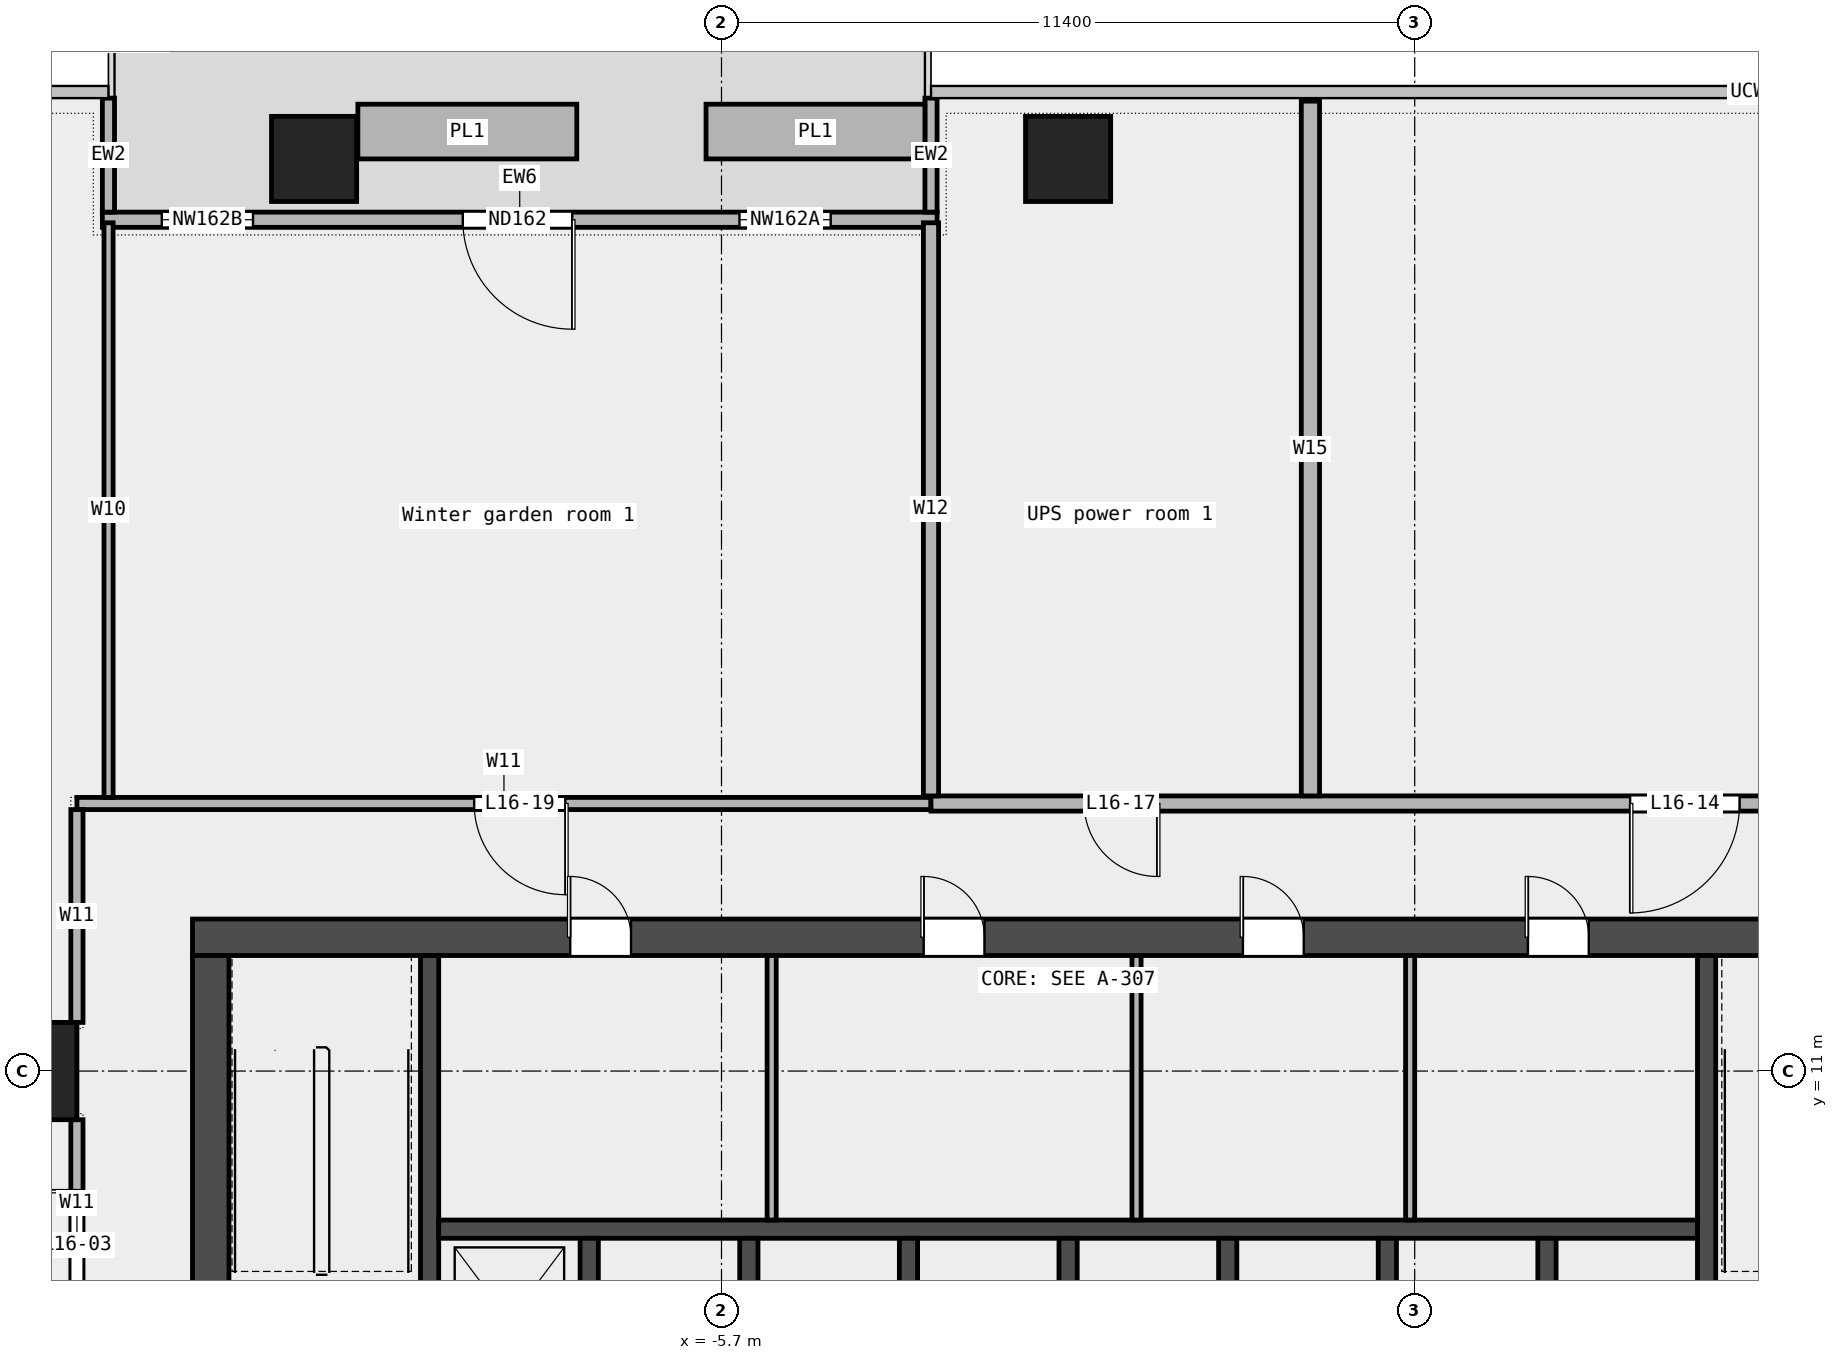
"""IFC4 building model, lengths in metres.
Left out: names, types, materials, properties, quantities, classifications, styles, units other than length and angle.
Written with IfcOpenShell. Run it as: python <this file> out.ifc"""

import sys

from ifc_helpers import new_model, si_unit, direction, frame, frame_2d, origin, origin_2d, place, context, subcontext, project, spatial, rectangle, extrude, element, fill, save


model = new_model("IFC4")
c1 = context("Model", 3, precision=1e-05, world=origin(), true_north=direction((0.0, 1.0)))
c2 = subcontext(c1, "Body", "Model", "MODEL_VIEW")
j1 = project(units=[si_unit("LENGTHUNIT", "METRE"), si_unit("PLANEANGLEUNIT", "RADIAN")], contexts=[c1])
p1 = place(None, origin())
s1 = spatial("IfcSite", under=j1, at=p1, CompositionType="ELEMENT")
p2 = place(p1, origin())
s2 = spatial("IfcBuilding", under=s1, at=p2, CompositionType="ELEMENT")
p3 = place(p2, frame((0.0, 0.0, 83.8)))
s3 = spatial("IfcBuildingStorey", under=s2, at=p3, CompositionType="ELEMENT", Elevation=83.8)
for number, where, z_axis, x_axis in (
    (1, (0.0, 26.0, 0.0), (0.0, 0.0, 1.0), (1.0, 0.0, 0.0)),
    (2, (-12.4, 26.0, 0.0), (0.0, 0.0, 1.0), (1.0, 0.0, 0.0)),
):
    element("IfcColumn", number, at=place(p3, frame(where, z_axis=z_axis, x_axis=x_axis)), inside=s3, PredefinedType="COLUMN", context=c2, shape_type="SweptSolid", body=[
        extrude(rectangle(XDim=1.4, YDim=1.4, at=origin_2d()), origin(), (0.0, 0.0, 1.0), 4.2),
    ])
p4 = place(p3, frame((-17.1, 11.0, 0.0), z_axis=(0.0, 0.0, 1.0), x_axis=(1.0, 0.0, 0.0)))
e3 = element("IfcColumn", 3, at=p4, inside=s3, PredefinedType="COLUMN", context=c2, shape_type="SweptSolid", body=[
    extrude(rectangle(XDim=1.6, YDim=1.6, at=origin_2d()), origin(), (0.0, 0.0, 1.0), 4.2),
])
p5 = place(p3, frame((-2.155, 25.0, 0.0), z_axis=(0.0, 0.0, 1.0), x_axis=(-1.0, 0.0, 0.0)))
e4 = element("IfcWall", 4, at=p5, inside=s3, PredefinedType="STANDARD", context=c2, shape_type="SweptSolid", body=[
    extrude(rectangle(XDim=13.727, YDim=0.25, at=frame_2d((6.864, 0.0))), origin(), (0.0, 0.0, 1.0), 4.2),
])
p6 = place(p5, frame((1.75, 0.0, 0.45)))
e5 = element("IfcOpeningElement", 5, at=p6, cuts=e4, PredefinedType="OPENING", context=c2, shape_type="SweptSolid", body=[
    extrude(rectangle(XDim=1.5, YDim=3.0, at=frame_2d((0.75, 1.5))), frame((0.0, 0.137, 0.0), z_axis=(0.0, -1.0, 0.0), x_axis=(1.0, 0.0, 0.0)), (0.0, 0.0, 1.0), 0.274),
])
p7 = place(p5, frame((6.0, 0.0, 0.0)))
e6 = element("IfcOpeningElement", 6, at=p7, cuts=e4, PredefinedType="OPENING", context=c2, shape_type="SweptSolid", body=[
    extrude(rectangle(XDim=1.8, YDim=2.4, at=frame_2d((0.9, 1.2))), frame((0.0, 0.137, 0.0), z_axis=(0.0, -1.0, 0.0), x_axis=(1.0, 0.0, 0.0)), (0.0, 0.0, 1.0), 0.274),
])
p8 = place(p5, frame((11.25, 0.0, 0.45)))
e7 = element("IfcOpeningElement", 7, at=p8, cuts=e4, PredefinedType="OPENING", context=c2, shape_type="SweptSolid", body=[
    extrude(rectangle(XDim=1.5, YDim=3.0, at=frame_2d((0.75, 1.5))), frame((0.0, 0.137, 0.0), z_axis=(0.0, -1.0, 0.0), x_axis=(1.0, 0.0, 0.0)), (0.0, 0.0, 1.0), 0.274),
])
for number, where, z_axis, x_axis in (
    (8, (-2.255, 27.0, 0.0), (0.0, 0.0, 1.0), (0.0, -1.0, 0.0)),
    (9, (-15.782, 27.0, 0.0), (0.0, 0.0, 1.0), (0.0, -1.0, 0.0)),
):
    element("IfcWall", number, at=place(p3, frame(where, z_axis=z_axis, x_axis=x_axis)), inside=s3, PredefinedType="STANDARD", context=c2, shape_type="SweptSolid", body=[
        extrude(rectangle(XDim=1.875, YDim=0.2, at=frame_2d((0.938, 0.0))), origin(), (0.0, 0.0, 1.0), 4.2),
    ])
for number, where, z_axis, x_axis in (
    (10, (-2.354, 26.45, 0.0), (0.0, 0.0, 1.0), (-1.0, 0.0, 0.0)),
    (11, (-8.08, 26.45, 0.0), (0.0, 0.0, 1.0), (-1.0, 0.0, 0.0)),
):
    element("IfcWall", number, at=place(p3, frame(where, z_axis=z_axis, x_axis=x_axis)), inside=s3, PredefinedType="STANDARD", context=c2, shape_type="SweptSolid", body=[
        extrude(rectangle(XDim=3.6, YDim=0.9, at=frame_2d((1.8, 0.0))), origin(), (0.0, 0.0, 1.0), 0.7),
    ])
p9 = place(p3, frame((-16.3, 15.4, 0.0), z_axis=(0.0, 0.0, 1.0), x_axis=(1.0, 0.0, 0.0)))
e12 = element("IfcWall", 12, at=p9, inside=s3, PredefinedType="PARTITIONING", context=c2, shape_type="SweptSolid", body=[
    extrude(rectangle(XDim=14.045, YDim=0.2, at=frame_2d((7.022, 0.0))), origin(), (0.0, 0.0, 1.0), 4.2),
])
p10 = place(p9, frame((6.532, 0.0, 0.0)))
e13 = element("IfcOpeningElement", 13, at=p10, cuts=e12, PredefinedType="OPENING", context=c2, shape_type="SweptSolid", body=[
    extrude(rectangle(XDim=1.5, YDim=2.1, at=frame_2d((0.75, 1.05))), frame((0.0, 0.112, 0.0), z_axis=(0.0, -1.0, 0.0), x_axis=(1.0, 0.0, 0.0)), (0.0, 0.0, 1.0), 0.224),
])
p11 = place(p3, frame((-2.255, 15.4, 0.0), z_axis=(0.0, 0.0, 1.0), x_axis=(1.0, 0.0, 0.0)))
e14 = element("IfcWall", 14, at=p11, inside=s3, PredefinedType="PARTITIONING", context=c2, shape_type="SweptSolid", body=[
    extrude(rectangle(XDim=33.005, YDim=0.25, at=frame_2d((16.502, 0.0))), origin(), (0.0, 0.0, 1.0), 4.2),
])
p12 = place(p11, frame((11.498, 0.0, 0.0)))
e15 = element("IfcOpeningElement", 15, at=p12, cuts=e14, PredefinedType="OPENING", context=c2, shape_type="SweptSolid", body=[
    extrude(rectangle(XDim=1.8, YDim=2.1, at=frame_2d((0.9, 1.05))), frame((0.0, 0.137, 0.0), z_axis=(0.0, -1.0, 0.0), x_axis=(1.0, 0.0, 0.0)), (0.0, 0.0, 1.0), 0.274),
])
p13 = place(p11, frame((2.52, 0.0, 0.0)))
e16 = element("IfcOpeningElement", 16, at=p13, cuts=e14, PredefinedType="OPENING", context=c2, shape_type="SweptSolid", body=[
    extrude(rectangle(XDim=1.2, YDim=2.1, at=frame_2d((0.6, 1.05))), frame((0.0, 0.137, 0.0), z_axis=(0.0, -1.0, 0.0), x_axis=(1.0, 0.0, 0.0)), (0.0, 0.0, 1.0), 0.274),
])
p14 = place(p3, frame((-16.3, 6.085, 0.0), z_axis=(0.0, 0.0, 1.0), x_axis=(0.0, 1.0, 0.0)))
e17 = element("IfcWall", 17, at=p14, inside=s3, PredefinedType="PARTITIONING", context=c2, shape_type="SweptSolid", body=[
    extrude(rectangle(XDim=4.115, YDim=0.2, at=frame_2d((2.058, 0.0))), origin(), (0.0, 0.0, 1.0), 4.2),
])
p15 = place(p14, frame((1.157, 0.0, 0.0)))
e18 = element("IfcOpeningElement", 18, at=p15, cuts=e17, PredefinedType="OPENING", context=c2, shape_type="SweptSolid", body=[
    extrude(rectangle(XDim=1.8, YDim=2.1, at=frame_2d((0.9, 1.05))), frame((0.0, 0.112, 0.0), z_axis=(0.0, -1.0, 0.0), x_axis=(1.0, 0.0, 0.0)), (0.0, 0.0, 1.0), 0.224),
])
p16 = place(p3, frame((-16.3, 11.8, 0.0), z_axis=(0.0, 0.0, 1.0), x_axis=(0.0, 1.0, 0.0)))
e19 = element("IfcWall", 19, at=p16, inside=s3, PredefinedType="PARTITIONING", context=c2, shape_type="SweptSolid", body=[
    extrude(rectangle(XDim=3.5, YDim=0.2, at=frame_2d((1.75, 0.0))), origin(), (0.0, 0.0, 1.0), 4.2),
])
p17 = place(p3, frame((-15.78, 15.5, 0.0), z_axis=(0.0, 0.0, 1.0), x_axis=(0.0, 1.0, 0.0)))
e20 = element("IfcWall", 20, at=p17, inside=s3, PredefinedType="PARTITIONING", context=c2, shape_type="SweptSolid", body=[
    extrude(rectangle(XDim=9.45, YDim=0.15, at=frame_2d((4.725, 0.0))), origin(), (0.0, 0.0, 1.0), 4.2),
])
p18 = place(p3, frame((-2.255, 15.525, 0.0), z_axis=(0.0, 0.0, 1.0), x_axis=(0.0, 1.0, 0.0)))
e21 = element("IfcWall", 21, at=p18, inside=s3, PredefinedType="PARTITIONING", context=c2, shape_type="SweptSolid", body=[
    extrude(rectangle(XDim=9.425, YDim=0.25, at=frame_2d((4.712, 0.0))), origin(), (0.0, 0.0, 1.0), 4.2),
])
p19 = place(p3, frame((3.985, 15.525, 0.0), z_axis=(0.0, 0.0, 1.0), x_axis=(0.0, 1.0, 0.0)))
e22 = element("IfcWall", 22, at=p19, inside=s3, PredefinedType="PARTITIONING", context=c2, shape_type="SweptSolid", body=[
    extrude(rectangle(XDim=11.425, YDim=0.3, at=frame_2d((5.712, 0.0))), origin(), (0.0, 0.0, 1.0), 4.2),
])
p20 = place(p3, frame((-14.4, 13.2, 0.0), z_axis=(0.0, 0.0, 1.0), x_axis=(1.0, 0.0, 0.0)))
e23 = element("IfcWall", 23, at=p20, inside=s3, PredefinedType="SHEAR", context=c2, shape_type="SweptSolid", body=[
    extrude(rectangle(XDim=28.8, YDim=0.6, at=frame_2d((14.4, 0.0))), origin(), (0.0, 0.0, 1.0), 4.5),
])
p21 = place(p20, frame((6.212, 0.0, 0.0)))
e24 = element("IfcOpeningElement", 24, at=p21, cuts=e23, PredefinedType="OPENING", context=c2, shape_type="SweptSolid", body=[
    extrude(rectangle(XDim=1.0, YDim=2.1, at=frame_2d((0.5, 1.05))), frame((0.0, 0.312, 0.0), z_axis=(0.0, -1.0, 0.0), x_axis=(1.0, 0.0, 0.0)), (0.0, 0.0, 1.0), 0.624),
])
p22 = place(p20, frame((12.025, 0.0, 0.0)))
e25 = element("IfcOpeningElement", 25, at=p22, cuts=e23, PredefinedType="OPENING", context=c2, shape_type="SweptSolid", body=[
    extrude(rectangle(XDim=1.0, YDim=2.1, at=frame_2d((0.5, 1.05))), frame((0.0, 0.312, 0.0), z_axis=(0.0, -1.0, 0.0), x_axis=(1.0, 0.0, 0.0)), (0.0, 0.0, 1.0), 0.624),
])
p23 = place(p20, frame((17.275, 0.0, 0.0)))
e26 = element("IfcOpeningElement", 26, at=p23, cuts=e23, PredefinedType="OPENING", context=c2, shape_type="SweptSolid", body=[
    extrude(rectangle(XDim=1.0, YDim=2.1, at=frame_2d((0.5, 1.05))), frame((0.0, 0.312, 0.0), z_axis=(0.0, -1.0, 0.0), x_axis=(1.0, 0.0, 0.0)), (0.0, 0.0, 1.0), 0.624),
])
p24 = place(p20, frame((21.962, 0.0, 0.0)))
e27 = element("IfcOpeningElement", 27, at=p24, cuts=e23, PredefinedType="OPENING", context=c2, shape_type="SweptSolid", body=[
    extrude(rectangle(XDim=1.0, YDim=2.1, at=frame_2d((0.5, 1.05))), frame((0.0, 0.312, 0.0), z_axis=(0.0, -1.0, 0.0), x_axis=(1.0, 0.0, 0.0)), (0.0, 0.0, 1.0), 0.624),
])
p25 = place(p3, frame((-14.1, -6.6, 0.0), z_axis=(0.0, 0.0, 1.0), x_axis=(0.0, 1.0, 0.0)))
e28 = element("IfcWall", 28, at=p25, inside=s3, PredefinedType="SHEAR", context=c2, shape_type="SweptSolid", body=[
    extrude(rectangle(XDim=19.5, YDim=0.6, at=frame_2d((9.75, 0.0))), origin(), (0.0, 0.0, 1.0), 4.5),
])
p26 = place(p25, frame((9.3, 0.0, 0.0)))
e29 = element("IfcOpeningElement", 29, at=p26, cuts=e28, PredefinedType="OPENING", context=c2, shape_type="SweptSolid", body=[
    extrude(rectangle(XDim=1.8, YDim=2.1, at=frame_2d((0.9, 1.05))), frame((0.0, 0.312, 0.0), z_axis=(0.0, -1.0, 0.0), x_axis=(1.0, 0.0, 0.0)), (0.0, 0.0, 1.0), 0.624),
])
for number, where, z_axis, x_axis in (
    (30, (-10.5, 5.25, 0.0), (0.0, 0.0, 1.0), (0.0, 1.0, 0.0)),
    (31, (10.5, 5.25, 0.0), (0.0, 0.0, 1.0), (0.0, 1.0, 0.0)),
):
    element("IfcWall", number, at=place(p3, frame(where, z_axis=z_axis, x_axis=x_axis)), inside=s3, PredefinedType="SHEAR", context=c2, shape_type="SweptSolid", body=[
        extrude(rectangle(XDim=7.65, YDim=0.3, at=frame_2d((3.825, 0.0))), origin(), (0.0, 0.0, 1.0), 4.5),
    ])
p27 = place(p3, frame((-10.35, 8.4, 0.0), z_axis=(0.0, 0.0, 1.0), x_axis=(1.0, 0.0, 0.0)))
e32 = element("IfcWall", 32, at=p27, inside=s3, PredefinedType="SOLIDWALL", context=c2, shape_type="SweptSolid", body=[
    extrude(rectangle(XDim=20.7, YDim=0.3, at=frame_2d((10.35, 0.0))), origin(), (0.0, 0.0, 1.0), 4.5),
])
for number, where, z_axis, x_axis in (
    (33, (-7.875, 5.55, 0.0), (0.0, 0.0, 1.0), (0.0, 1.0, 0.0)),
    (34, (-5.25, 5.55, 0.0), (0.0, 0.0, 1.0), (0.0, 1.0, 0.0)),
    (35, (-2.625, 5.55, 0.0), (0.0, 0.0, 1.0), (0.0, 1.0, 0.0)),
    (36, (0.0, 5.55, 0.0), (0.0, 0.0, 1.0), (0.0, 1.0, 0.0)),
    (37, (2.625, 5.55, 0.0), (0.0, 0.0, 1.0), (0.0, 1.0, 0.0)),
    (38, (5.25, 5.55, 0.0), (0.0, 0.0, 1.0), (0.0, 1.0, 0.0)),
    (39, (7.875, 5.55, 0.0), (0.0, 0.0, 1.0), (0.0, 1.0, 0.0)),
):
    element("IfcWall", number, at=place(p3, frame(where, z_axis=z_axis, x_axis=x_axis)), inside=s3, PredefinedType="SOLIDWALL", context=c2, shape_type="SweptSolid", body=[
        extrude(rectangle(XDim=2.7, YDim=0.3, at=frame_2d((1.35, 0.0))), origin(), (0.0, 0.0, 1.0), 4.5),
    ])
for number, where, z_axis, x_axis in (
    (40, (-4.875, 8.55, 0.0), (0.0, 0.0, 1.0), (0.0, 1.0, 0.0)),
    (41, (1.125, 8.55, 0.0), (0.0, 0.0, 1.0), (0.0, 1.0, 0.0)),
    (42, (5.625, 8.55, 0.0), (0.0, 0.0, 1.0), (0.0, 1.0, 0.0)),
):
    element("IfcWall", number, at=place(p3, frame(where, z_axis=z_axis, x_axis=x_axis)), inside=s3, PredefinedType="PARTITIONING", context=c2, shape_type="SweptSolid", body=[
        extrude(rectangle(XDim=4.35, YDim=0.15, at=frame_2d((2.175, 0.0))), origin(), (0.0, 0.0, 1.0), 4.5),
    ])
p28 = place(p6, origin())
e43 = element("IfcWindow", 43, at=p28, inside=s3, PartitioningType="SINGLE_PANEL", PredefinedType="WINDOW", context=c2, shape_type="SweptSolid", body=[
    extrude(rectangle(XDim=1.5, YDim=3.0, at=frame_2d((0.75, 1.5))), frame((0.0, 0.03, 0.0), z_axis=(0.0, -1.0, 0.0), x_axis=(1.0, 0.0, 0.0)), (0.0, 0.0, 1.0), 0.06),
])
fill(e5, e43)
p29 = place(p7, origin())
e44 = element("IfcDoor", 44, at=p29, inside=s3, OperationType="DOUBLE_DOOR_SINGLE_SWING", PredefinedType="DOOR", context=c2, shape_type="SweptSolid", body=[
    extrude(rectangle(XDim=1.8, YDim=2.4, at=frame_2d((0.9, 1.2))), frame((0.0, 0.025, 0.0), z_axis=(0.0, -1.0, 0.0), x_axis=(1.0, 0.0, 0.0)), (0.0, 0.0, 1.0), 0.05),
])
fill(e6, e44)
p30 = place(p8, origin())
e45 = element("IfcWindow", 45, at=p30, inside=s3, PartitioningType="SINGLE_PANEL", PredefinedType="WINDOW", context=c2, shape_type="SweptSolid", body=[
    extrude(rectangle(XDim=1.5, YDim=3.0, at=frame_2d((0.75, 1.5))), frame((0.0, 0.03, 0.0), z_axis=(0.0, -1.0, 0.0), x_axis=(1.0, 0.0, 0.0)), (0.0, 0.0, 1.0), 0.06),
])
fill(e7, e45)
p31 = place(p15, origin())
e46 = element("IfcDoor", 46, at=p31, inside=s3, OperationType="DOUBLE_DOOR_SINGLE_SWING", PredefinedType="DOOR", context=c2, shape_type="SweptSolid", body=[
    extrude(rectangle(XDim=1.8, YDim=2.1, at=frame_2d((0.9, 1.05))), frame((0.0, 0.025, 0.0), z_axis=(0.0, -1.0, 0.0), x_axis=(1.0, 0.0, 0.0)), (0.0, 0.0, 1.0), 0.05),
])
fill(e18, e46)
p32 = place(p12, origin())
e47 = element("IfcDoor", 47, at=p32, inside=s3, OperationType="DOUBLE_DOOR_SINGLE_SWING", PredefinedType="DOOR", context=c2, shape_type="SweptSolid", body=[
    extrude(rectangle(XDim=1.8, YDim=2.1, at=frame_2d((0.9, 1.05))), frame((0.0, 0.025, 0.0), z_axis=(0.0, -1.0, 0.0), x_axis=(1.0, 0.0, 0.0)), (0.0, 0.0, 1.0), 0.05),
])
fill(e15, e47)
p33 = place(p13, origin())
e48 = element("IfcDoor", 48, at=p33, inside=s3, OperationType="SINGLE_SWING_LEFT", PredefinedType="DOOR", context=c2, shape_type="SweptSolid", body=[
    extrude(rectangle(XDim=1.2, YDim=2.1, at=frame_2d((0.6, 1.05))), frame((0.0, 0.025, 0.0), z_axis=(0.0, -1.0, 0.0), x_axis=(1.0, 0.0, 0.0)), (0.0, 0.0, 1.0), 0.05),
])
fill(e16, e48)
p34 = place(p10, origin())
e49 = element("IfcDoor", 49, at=p34, inside=s3, OperationType="DOUBLE_DOOR_SINGLE_SWING", PredefinedType="DOOR", context=c2, shape_type="SweptSolid", body=[
    extrude(rectangle(XDim=1.5, YDim=2.1, at=frame_2d((0.75, 1.05))), frame((0.0, 0.025, 0.0), z_axis=(0.0, -1.0, 0.0), x_axis=(1.0, 0.0, 0.0)), (0.0, 0.0, 1.0), 0.05),
])
fill(e13, e49)
p35 = place(p21, origin())
e50 = element("IfcDoor", 50, at=p35, inside=s3, OperationType="SINGLE_SWING_LEFT", PredefinedType="DOOR", context=c2, shape_type="SweptSolid", body=[
    extrude(rectangle(XDim=1.0, YDim=2.1, at=frame_2d((0.5, 1.05))), frame((0.0, 0.025, 0.0), z_axis=(0.0, -1.0, 0.0), x_axis=(1.0, 0.0, 0.0)), (0.0, 0.0, 1.0), 0.05),
])
fill(e24, e50)
p36 = place(p22, origin())
e51 = element("IfcDoor", 51, at=p36, inside=s3, OperationType="SINGLE_SWING_LEFT", PredefinedType="DOOR", context=c2, shape_type="SweptSolid", body=[
    extrude(rectangle(XDim=1.0, YDim=2.1, at=frame_2d((0.5, 1.05))), frame((0.0, 0.025, 0.0), z_axis=(0.0, -1.0, 0.0), x_axis=(1.0, 0.0, 0.0)), (0.0, 0.0, 1.0), 0.05),
])
fill(e25, e51)
p37 = place(p23, origin())
e52 = element("IfcDoor", 52, at=p37, inside=s3, OperationType="SINGLE_SWING_LEFT", PredefinedType="DOOR", context=c2, shape_type="SweptSolid", body=[
    extrude(rectangle(XDim=1.0, YDim=2.1, at=frame_2d((0.5, 1.05))), frame((0.0, 0.025, 0.0), z_axis=(0.0, -1.0, 0.0), x_axis=(1.0, 0.0, 0.0)), (0.0, 0.0, 1.0), 0.05),
])
fill(e26, e52)
p38 = place(p24, origin())
e53 = element("IfcDoor", 53, at=p38, inside=s3, OperationType="SINGLE_SWING_LEFT", PredefinedType="DOOR", context=c2, shape_type="SweptSolid", body=[
    extrude(rectangle(XDim=1.0, YDim=2.1, at=frame_2d((0.5, 1.05))), frame((0.0, 0.025, 0.0), z_axis=(0.0, -1.0, 0.0), x_axis=(1.0, 0.0, 0.0)), (0.0, 0.0, 1.0), 0.05),
])
fill(e27, e53)
save(model, sys.argv[1])
